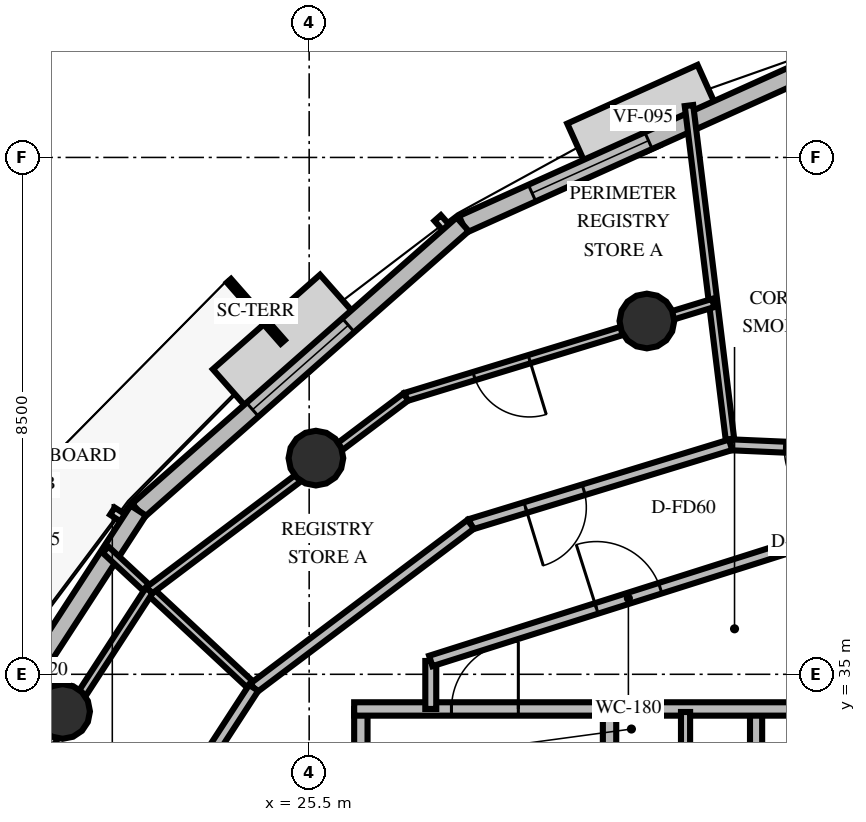
"""IFC4 building model, lengths in metres.
Left out: names, types, materials, properties, quantities, classifications, styles, units other than length and angle.
Written with IfcOpenShell. Run it as: python <this file> out.ifc"""

import sys

from ifc_helpers import new_model, si_unit, direction, frame, frame_2d, origin, origin_2d, place, context, subcontext, project, spatial, rectangle, circle, extrude, element, fill, save


model = new_model("IFC4")
c1 = context("Model", 3, precision=1e-05, world=origin(), true_north=direction((0.0, 1.0)))
c2 = subcontext(c1, "Body", "Model", "MODEL_VIEW")
j1 = project(units=[si_unit("LENGTHUNIT", "METRE"), si_unit("PLANEANGLEUNIT", "RADIAN")], contexts=[c1])
p1 = place(None, origin())
s1 = spatial("IfcSite", under=j1, at=p1, CompositionType="ELEMENT")
p2 = place(p1, origin())
s2 = spatial("IfcBuilding", under=s1, at=p2, CompositionType="ELEMENT")
p3 = place(p2, frame((0.0, 0.0, 266.4)))
s3 = spatial("IfcBuildingStorey", under=s2, at=p3, CompositionType="ELEMENT", Elevation=266.4)
for number, where, z_axis, x_axis in (
    (1, (31.054, 40.81, 0.0), (0.0, 0.0, 1.0), (1.0, 0.0, 0.0)),
    (2, (25.611, 38.555, 0.0), (0.0, 0.0, 1.0), (1.0, 0.0, 0.0)),
    (3, (21.445, 34.389, 0.0), (0.0, 0.0, 1.0), (1.0, 0.0, 0.0)),
):
    element("IfcColumn", number, at=place(p3, frame(where, z_axis=z_axis, x_axis=x_axis)), inside=s3, PredefinedType="COLUMN", context=c2, shape_type="SweptSolid", body=[
        extrude(circle(Radius=0.45, at=origin_2d()), origin(), (0.0, 0.0, 1.0), 3.6),
    ])
p4 = place(p3, frame((34.082, 45.128, 0.0), z_axis=(0.0, 0.0, 1.0), x_axis=(-0.911790805928, -0.410654996592, 0.0)))
e4 = element("IfcWall", 4, at=p4, inside=s3, PredefinedType="SOLIDWALL", context=c2, shape_type="SweptSolid", body=[
    extrude(rectangle(XDim=6.643, YDim=0.3, at=frame_2d((3.322, 0.0))), origin(), (0.0, 0.0, 1.0), 2.76),
])
p5 = place(p4, frame((3.292, 0.0, 0.8)))
e5 = element("IfcOpeningElement", 5, at=p5, cuts=e4, PredefinedType="OPENING", context=c2, shape_type="SweptSolid", body=[
    extrude(rectangle(XDim=2.1, YDim=1.85, at=frame_2d((1.05, 0.925))), frame((0.0, 0.16, 0.0), z_axis=(0.0, -1.0, 0.0), x_axis=(1.0, 0.0, 0.0)), (0.0, 0.0, 1.0), 0.32),
])
p6 = place(p3, frame((28.025, 42.4, 0.0), z_axis=(0.0, 0.0, 1.0), x_axis=(-0.750016069433, -0.661419606295, 0.0)))
e6 = element("IfcWall", 6, at=p6, inside=s3, PredefinedType="SOLIDWALL", context=c2, shape_type="SweptSolid", body=[
    extrude(rectangle(XDim=7.115, YDim=0.3, at=frame_2d((3.558, 0.0))), origin(), (0.0, 0.0, 1.0), 2.76),
])
p7 = place(p6, frame((2.508, 0.0, 0.8)))
e7 = element("IfcOpeningElement", 7, at=p7, cuts=e6, PredefinedType="OPENING", context=c2, shape_type="SweptSolid", body=[
    extrude(rectangle(XDim=2.1, YDim=1.85, at=frame_2d((1.05, 0.925))), frame((0.0, 0.16, 0.0), z_axis=(0.0, -1.0, 0.0), x_axis=(1.0, 0.0, 0.0)), (0.0, 0.0, 1.0), 0.32),
])
p8 = place(p3, frame((22.689, 37.694, 0.0), z_axis=(0.0, 0.0, 1.0), x_axis=(-0.544632964152, -0.838674510379, 0.0)))
e8 = element("IfcWall", 8, at=p8, inside=s3, PredefinedType="SOLIDWALL", context=c2, shape_type="SweptSolid", body=[
    extrude(rectangle(XDim=7.293, YDim=0.3, at=frame_2d((3.646, 0.0))), origin(), (0.0, 0.0, 1.0), 2.76),
])
p9 = place(p8, frame((5.87, 0.0, 0.0)))
e9 = element("IfcOpeningElement", 9, at=p9, cuts=e8, PredefinedType="OPENING", context=c2, shape_type="SweptSolid", body=[
    extrude(rectangle(XDim=1.05, YDim=2.15, at=frame_2d((0.525, 1.075))), frame((0.0, 0.16, 0.0), z_axis=(0.0, -1.0, 0.0), x_axis=(1.0, 0.0, 0.0)), (0.0, 0.0, 1.0), 0.32),
])
p10 = place(p3, frame((26.35, 30.05, 0.0), z_axis=(0.0, 0.0, 1.0), x_axis=(0.0, 1.0, 0.0)))
e10 = element("IfcWall", 10, at=p10, inside=s3, PredefinedType="SOLIDWALL", context=c2, shape_type="SweptSolid", body=[
    extrude(rectangle(XDim=4.38, YDim=0.22, at=frame_2d((2.19, 0.0))), origin(), (0.0, 0.0, 1.0), 2.46),
])
p11 = place(p3, frame((30.44, 30.05, 0.0), z_axis=(0.0, 0.0, 1.0), x_axis=(0.0, 1.0, 0.0)))
e11 = element("IfcWall", 11, at=p11, inside=s3, PredefinedType="SOLIDWALL", context=c2, shape_type="SweptSolid", body=[
    extrude(rectangle(XDim=4.38, YDim=0.22, at=frame_2d((2.19, 0.0))), origin(), (0.0, 0.0, 1.0), 2.46),
])
p12 = place(p11, frame((0.8, 0.0, 0.0)))
e12 = element("IfcOpeningElement", 12, at=p12, cuts=e11, PredefinedType="OPENING", context=c2, shape_type="SweptSolid", body=[
    extrude(rectangle(XDim=1.05, YDim=2.1, at=frame_2d((0.525, 1.05))), frame((0.0, 0.12, 0.0), z_axis=(0.0, -1.0, 0.0), x_axis=(1.0, 0.0, 0.0)), (0.0, 0.0, 1.0), 0.24),
])
p13 = place(p3, frame((26.24, 34.43, 0.0), z_axis=(0.0, 0.0, 1.0), x_axis=(1.0, 0.0, 0.0)))
e13 = element("IfcWall", 13, at=p13, inside=s3, PredefinedType="SOLIDWALL", context=c2, shape_type="SweptSolid", body=[
    extrude(rectangle(XDim=4.31, YDim=0.22, at=frame_2d((2.155, 0.0))), origin(), (0.0, 0.0, 1.0), 2.46),
])
p14 = place(p13, frame((1.6, 0.0, 0.0)))
e14 = element("IfcOpeningElement", 14, at=p14, cuts=e13, PredefinedType="OPENING", context=c2, shape_type="SweptSolid", body=[
    extrude(rectangle(XDim=1.1, YDim=2.15, at=frame_2d((0.55, 1.075))), frame((0.0, 0.12, 0.0), z_axis=(0.0, -1.0, 0.0), x_axis=(1.0, 0.0, 0.0)), (0.0, 0.0, 1.0), 0.24),
])
p15 = place(p3, frame((32.85, 30.05, 0.0), z_axis=(0.0, 0.0, 1.0), x_axis=(0.0, 1.0, 0.0)))
e15 = element("IfcWall", 15, at=p15, inside=s3, PredefinedType="SOLIDWALL", context=c2, shape_type="SweptSolid", body=[
    extrude(rectangle(XDim=4.38, YDim=0.2, at=frame_2d((2.19, 0.0))), origin(), (0.0, 0.0, 1.0), 2.46),
])
p16 = place(p15, frame((2.65, 0.0, 0.0)))
e16 = element("IfcOpeningElement", 16, at=p16, cuts=e15, PredefinedType="OPENING", context=c2, shape_type="SweptSolid", body=[
    extrude(rectangle(XDim=0.86, YDim=2.05, at=frame_2d((0.43, 1.025))), frame((0.0, 0.11, 0.0), z_axis=(0.0, -1.0, 0.0), x_axis=(1.0, 0.0, 0.0)), (0.0, 0.0, 1.0), 0.22),
])
p17 = place(p3, frame((30.44, 34.43, 0.0), z_axis=(0.0, 0.0, 1.0), x_axis=(1.0, 0.0, 0.0)))
e17 = element("IfcWall", 17, at=p17, inside=s3, PredefinedType="SOLIDWALL", context=c2, shape_type="SweptSolid", body=[
    extrude(rectangle(XDim=7.12, YDim=0.22, at=frame_2d((3.56, 0.0))), origin(), (0.0, 0.0, 1.0), 2.46),
])
p18 = place(p17, frame((3.01, 0.0, 0.0)))
e18 = element("IfcOpeningElement", 18, at=p18, cuts=e17, PredefinedType="OPENING", context=c2, shape_type="SweptSolid", body=[
    extrude(rectangle(XDim=1.1, YDim=2.15, at=frame_2d((0.55, 1.075))), frame((0.0, 0.12, 0.0), z_axis=(0.0, -1.0, 0.0), x_axis=(1.0, 0.0, 0.0)), (0.0, 0.0, 1.0), 0.24),
])
p19 = place(p3, frame((31.69, 32.05, 0.0), z_axis=(0.0, 0.0, 1.0), x_axis=(0.0, 1.0, 0.0)))
e19 = element("IfcWall", 19, at=p19, inside=s3, PredefinedType="PARTITIONING", context=c2, shape_type="SweptSolid", body=[
    extrude(rectangle(XDim=2.33, YDim=0.15, at=frame_2d((1.165, 0.0))), origin(), (0.0, 0.0, 1.0), 2.46),
])
p20 = place(p19, frame((0.65, 0.0, 0.0)))
e20 = element("IfcOpeningElement", 20, at=p20, cuts=e19, PredefinedType="OPENING", context=c2, shape_type="SweptSolid", body=[
    extrude(rectangle(XDim=0.86, YDim=2.05, at=frame_2d((0.43, 1.025))), frame((0.0, 0.085, 0.0), z_axis=(0.0, -1.0, 0.0), x_axis=(1.0, 0.0, 0.0)), (0.0, 0.0, 1.0), 0.17),
])
p21 = place(p3, frame((27.5, 34.43, 0.0), z_axis=(0.0, 0.0, 1.0), x_axis=(0.0, 1.0, 0.0)))
e21 = element("IfcWall", 21, at=p21, inside=s3, PredefinedType="PARTITIONING", context=c2, shape_type="SweptSolid", body=[
    extrude(rectangle(XDim=0.789, YDim=0.18, at=frame_2d((0.395, 0.0))), origin(), (0.0, 0.0, 1.0), 2.46),
])
p22 = place(p3, frame((27.5, 35.219, 0.0), z_axis=(0.0, 0.0, 1.0), x_axis=(0.953228121756, 0.302251795518, 0.0)))
e22 = element("IfcWall", 22, at=p22, inside=s3, PredefinedType="PARTITIONING", context=c2, shape_type="SweptSolid", body=[
    extrude(rectangle(XDim=6.819, YDim=0.18, at=frame_2d((3.409, 0.0))), origin(), (0.0, 0.0, 1.0), 2.46),
])
p23 = place(p22, frame((2.86, 0.0, 0.0)))
e23 = element("IfcOpeningElement", 23, at=p23, cuts=e22, PredefinedType="OPENING", context=c2, shape_type="SweptSolid", body=[
    extrude(rectangle(XDim=1.1, YDim=2.15, at=frame_2d((0.55, 1.075))), frame((0.0, 0.1, 0.0), z_axis=(0.0, -1.0, 0.0), x_axis=(1.0, 0.0, 0.0)), (0.0, 0.0, 1.0), 0.2),
])
p24 = place(p3, frame((32.431, 38.774, 0.0), z_axis=(0.0, 0.0, 1.0), x_axis=(-0.12183199788, 0.992550736382, 0.0)))
e24 = element("IfcWall", 24, at=p24, inside=s3, PredefinedType="PARTITIONING", context=c2, shape_type="SweptSolid", body=[
    extrude(rectangle(XDim=5.621, YDim=0.14, at=frame_2d((2.811, 0.0))), origin(), (0.0, 0.0, 1.0), 2.46),
])
p25 = place(p3, frame((36.676, 38.589, 0.0), z_axis=(0.0, 0.0, 1.0), x_axis=(-0.999048335503, 0.043616778064, 0.0)))
e25 = element("IfcWall", 25, at=p25, inside=s3, PredefinedType="PARTITIONING", context=c2, shape_type="SweptSolid", body=[
    extrude(rectangle(XDim=4.249, YDim=0.18, at=frame_2d((2.124, 0.0))), origin(), (0.0, 0.0, 1.0), 2.46),
])
p26 = place(p25, frame((2.361, 0.0, 0.0)))
e26 = element("IfcOpeningElement", 26, at=p26, cuts=e25, PredefinedType="OPENING", context=c2, shape_type="SweptSolid", body=[
    extrude(rectangle(XDim=1.0, YDim=2.15, at=frame_2d((0.5, 1.075))), frame((0.0, 0.1, 0.0), z_axis=(0.0, -1.0, 0.0), x_axis=(1.0, 0.0, 0.0)), (0.0, 0.0, 1.0), 0.2),
])
p27 = place(p3, frame((24.587, 34.777, 0.0), z_axis=(0.0, 0.0, 1.0), x_axis=(-0.731340377031, 0.682012648654, 0.0)))
e27 = element("IfcWall", 27, at=p27, inside=s3, PredefinedType="PARTITIONING", context=c2, shape_type="SweptSolid", body=[
    extrude(rectangle(XDim=3.331, YDim=0.14, at=frame_2d((1.666, 0.0))), origin(), (0.0, 0.0, 1.0), 2.46),
])
p28 = place(p3, frame((32.431, 38.774, 0.0), z_axis=(0.0, 0.0, 1.0), x_axis=(-0.956300674808, -0.292385053247, 0.0)))
e28 = element("IfcWall", 28, at=p28, inside=s3, PredefinedType="PARTITIONING", context=c2, shape_type="SweptSolid", body=[
    extrude(rectangle(XDim=4.47, YDim=0.18, at=frame_2d((2.235, 0.0))), origin(), (0.0, 0.0, 1.0), 2.46),
])
p29 = place(p28, frame((2.527, 0.0, 0.0)))
e29 = element("IfcOpeningElement", 29, at=p29, cuts=e28, PredefinedType="OPENING", context=c2, shape_type="SweptSolid", body=[
    extrude(rectangle(XDim=1.0, YDim=2.15, at=frame_2d((0.5, 1.075))), frame((0.0, 0.1, 0.0), z_axis=(0.0, -1.0, 0.0), x_axis=(1.0, 0.0, 0.0)), (0.0, 0.0, 1.0), 0.2),
])
p30 = place(p3, frame((28.157, 37.467, 0.0), z_axis=(0.0, 0.0, 1.0), x_axis=(-0.798627995496, -0.601824995169, 0.0)))
e30 = element("IfcWall", 30, at=p30, inside=s3, PredefinedType="PARTITIONING", context=c2, shape_type="SweptSolid", body=[
    extrude(rectangle(XDim=4.47, YDim=0.18, at=frame_2d((2.235, 0.0))), origin(), (0.0, 0.0, 1.0), 2.46),
])
p31 = place(p3, frame((32.145, 41.107, 0.0), z_axis=(0.0, 0.0, 1.0), x_axis=(-0.956289877959, -0.292420364053, 0.0)))
e31 = element("IfcWall", 31, at=p31, inside=s3, PredefinedType="PARTITIONING", context=c2, shape_type="SweptSolid", body=[
    extrude(rectangle(XDim=5.286, YDim=0.14, at=frame_2d((2.643, 0.0))), origin(), (0.0, 0.0, 1.0), 2.46),
])
p32 = place(p31, frame((3.162, 0.0, 0.0)))
e32 = element("IfcOpeningElement", 32, at=p32, cuts=e31, PredefinedType="OPENING", context=c2, shape_type="SweptSolid", body=[
    extrude(rectangle(XDim=0.95, YDim=2.15, at=frame_2d((0.475, 1.075))), frame((0.0, 0.08, 0.0), z_axis=(0.0, -1.0, 0.0), x_axis=(1.0, 0.0, 0.0)), (0.0, 0.0, 1.0), 0.16),
])
p33 = place(p3, frame((27.09, 39.561, 0.0), z_axis=(0.0, 0.0, 1.0), x_axis=(-0.798628918632, -0.601823770156, 0.0)))
e33 = element("IfcWall", 33, at=p33, inside=s3, PredefinedType="PARTITIONING", context=c2, shape_type="SweptSolid", body=[
    extrude(rectangle(XDim=5.286, YDim=0.14, at=frame_2d((2.643, 0.0))), origin(), (0.0, 0.0, 1.0), 2.46),
])
p34 = place(p3, frame((24.587, 34.777, 0.0), z_axis=(0.0, 0.0, 1.0), x_axis=(-0.544638874192, -0.838670672385, 0.0)))
e34 = element("IfcWall", 34, at=p34, inside=s3, PredefinedType="PARTITIONING", context=c2, shape_type="SweptSolid", body=[
    extrude(rectangle(XDim=4.47, YDim=0.18, at=frame_2d((2.235, 0.0))), origin(), (0.0, 0.0, 1.0), 2.46),
])
p35 = place(p3, frame((22.869, 36.38, 0.0), z_axis=(0.0, 0.0, 1.0), x_axis=(-0.54466198204, -0.838655665527, 0.0)))
e35 = element("IfcWall", 35, at=p35, inside=s3, PredefinedType="PARTITIONING", context=c2, shape_type="SweptSolid", body=[
    extrude(rectangle(XDim=5.286, YDim=0.14, at=frame_2d((2.643, 0.0))), origin(), (0.0, 0.0, 1.0), 2.46),
])
p36 = place(p5, origin())
e36 = element("IfcWindow", 36, at=p36, inside=s3, PartitioningType="SINGLE_PANEL", PredefinedType="WINDOW", context=c2, shape_type="SweptSolid", body=[
    extrude(rectangle(XDim=2.1, YDim=1.85, at=frame_2d((1.05, 0.925))), frame((0.0, 0.03, 0.0), z_axis=(0.0, -1.0, 0.0), x_axis=(1.0, 0.0, 0.0)), (0.0, 0.0, 1.0), 0.06),
])
fill(e5, e36)
p37 = place(p7, origin())
e37 = element("IfcWindow", 37, at=p37, inside=s3, PartitioningType="SINGLE_PANEL", PredefinedType="WINDOW", context=c2, shape_type="SweptSolid", body=[
    extrude(rectangle(XDim=2.1, YDim=1.85, at=frame_2d((1.05, 0.925))), frame((0.0, 0.03, 0.0), z_axis=(0.0, -1.0, 0.0), x_axis=(1.0, 0.0, 0.0)), (0.0, 0.0, 1.0), 0.06),
])
fill(e7, e37)
p38 = place(p14, origin())
e38 = element("IfcDoor", 38, at=p38, inside=s3, OperationType="SINGLE_SWING_RIGHT", PredefinedType="DOOR", context=c2, shape_type="SweptSolid", body=[
    extrude(rectangle(XDim=1.1, YDim=2.15, at=frame_2d((0.55, 1.075))), frame((0.0, 0.025, 0.0), z_axis=(0.0, -1.0, 0.0), x_axis=(1.0, 0.0, 0.0)), (0.0, 0.0, 1.0), 0.05),
])
fill(e14, e38)
p39 = place(p23, origin())
e39 = element("IfcDoor", 39, at=p39, inside=s3, OperationType="SINGLE_SWING_LEFT", PredefinedType="DOOR", context=c2, shape_type="SweptSolid", body=[
    extrude(rectangle(XDim=1.1, YDim=2.15, at=frame_2d((0.55, 1.075))), frame((0.0, 0.025, 0.0), z_axis=(0.0, -1.0, 0.0), x_axis=(1.0, 0.0, 0.0)), (0.0, 0.0, 1.0), 0.05),
])
fill(e23, e39)
p40 = place(p26, origin())
e40 = element("IfcDoor", 40, at=p40, inside=s3, OperationType="SINGLE_SWING_LEFT", PredefinedType="DOOR", context=c2, shape_type="SweptSolid", body=[
    extrude(rectangle(XDim=1.0, YDim=2.15, at=frame_2d((0.5, 1.075))), frame((0.0, 0.025, 0.0), z_axis=(0.0, -1.0, 0.0), x_axis=(1.0, 0.0, 0.0)), (0.0, 0.0, 1.0), 0.05),
])
fill(e26, e40)
p41 = place(p29, origin())
e41 = element("IfcDoor", 41, at=p41, inside=s3, OperationType="SINGLE_SWING_RIGHT", PredefinedType="DOOR", context=c2, shape_type="SweptSolid", body=[
    extrude(rectangle(XDim=1.0, YDim=2.15, at=frame_2d((0.5, 1.075))), frame((0.0, 0.025, 0.0), z_axis=(0.0, -1.0, 0.0), x_axis=(1.0, 0.0, 0.0)), (0.0, 0.0, 1.0), 0.05),
])
fill(e29, e41)
p42 = place(p32, origin())
e42 = element("IfcDoor", 42, at=p42, inside=s3, OperationType="SINGLE_SWING_LEFT", PredefinedType="DOOR", context=c2, shape_type="SweptSolid", body=[
    extrude(rectangle(XDim=0.95, YDim=2.15, at=frame_2d((0.475, 1.075))), frame((0.0, 0.025, 0.0), z_axis=(0.0, -1.0, 0.0), x_axis=(1.0, 0.0, 0.0)), (0.0, 0.0, 1.0), 0.05),
])
fill(e32, e42)
save(model, sys.argv[1])
